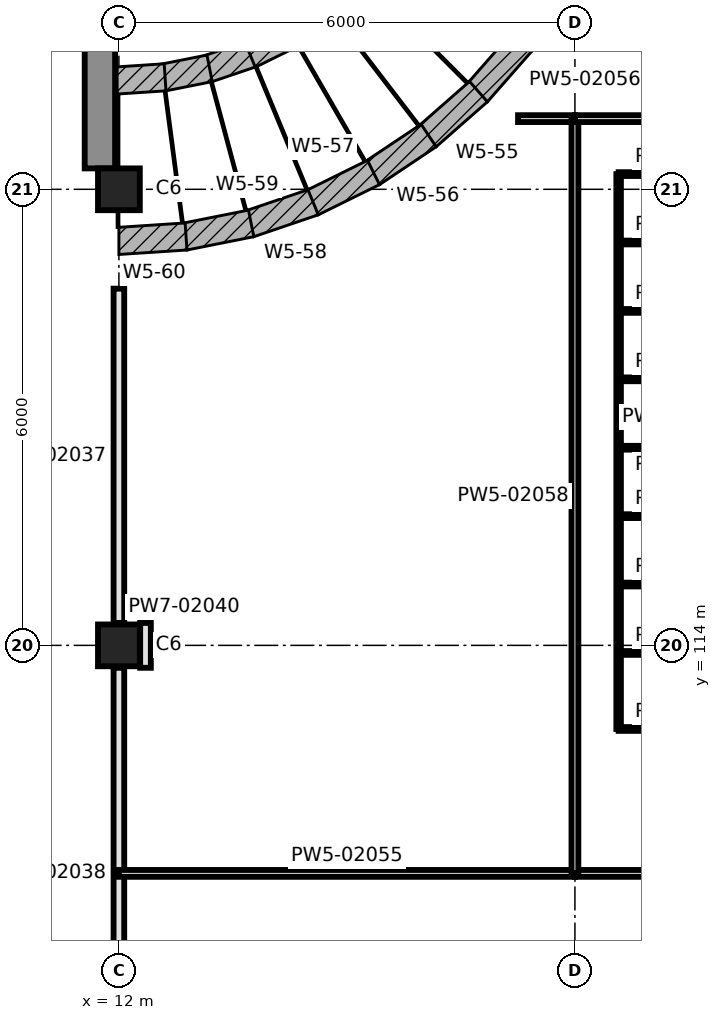
"""IFC4 building model, lengths in metres.
Left out: names, types, materials, properties, quantities, classifications, styles, units other than length and angle.
Written with IfcOpenShell. Run it as: python <this file> out.ifc"""

import sys

from ifc_helpers import new_model, si_unit, direction, frame, frame_2d, origin, origin_2d, place, context, subcontext, project, spatial, polyline, rectangle, outline, extrude, element, fill, save


model = new_model("IFC4")
c1 = context("Model", 3, precision=1e-05, world=origin(), true_north=direction((0.0, 1.0)))
c2 = subcontext(c1, "Body", "Model", "MODEL_VIEW")
j1 = project(units=[si_unit("LENGTHUNIT", "METRE"), si_unit("PLANEANGLEUNIT", "RADIAN")], contexts=[c1])
p1 = place(None, origin())
s1 = spatial("IfcSite", under=j1, at=p1, CompositionType="ELEMENT")
p2 = place(p1, origin())
s2 = spatial("IfcBuilding", under=s1, at=p2, CompositionType="ELEMENT")
p3 = place(p2, frame((0.0, 0.0, 12.0)))
s3 = spatial("IfcBuildingStorey", under=s2, at=p3, CompositionType="ELEMENT", Elevation=12.0)
for number, where, z_axis, x_axis in (
    (1, (12.0, 114.0, 0.0), (0.0, 0.0, 1.0), (1.0, 0.0, 0.0)),
    (2, (12.0, 120.0, 0.0), (0.0, 0.0, 1.0), (1.0, 0.0, 0.0)),
):
    element("IfcColumn", number, at=place(p3, frame(where, z_axis=z_axis, x_axis=x_axis)), inside=s3, PredefinedType="COLUMN", context=c2, shape_type="SweptSolid", body=[
        extrude(rectangle(XDim=0.55, YDim=0.55, at=origin_2d()), origin(), (0.0, 0.0, 1.0), 4.25),
    ])
p4 = place(p3, frame((17.938, 122.571, 0.0), z_axis=(0.74138193161, -0.495258620594, 0.452848462745), x_axis=(-0.555487117891, -0.831525141854, 1.792587e-05)))
e3 = element("IfcWall", 3, at=p4, inside=s3, PredefinedType="SOLIDWALL", context=c2, shape_type="SweptSolid", body=[
    extrude(outline(polyline([(0.0, 0.0), (0.897, -2.776e-17), (0.759, -4.654), (0.138, -4.655), (0.0, 0.0)])), origin(), (9.955e-05, 0.453, 0.892), 0.449),
])
p5 = place(p3, frame((17.44, 121.825, 0.0), z_axis=(0.67027340996, -0.587941516676, 0.452833665786), x_axis=(-0.659435029258, -0.751761559077, 2.1938488e-05)))
e4 = element("IfcWall", 4, at=p5, inside=s3, PredefinedType="SOLIDWALL", context=c2, shape_type="SweptSolid", body=[
    extrude(outline(polyline([(0.0, 0.0), (0.897, -2.776e-17), (0.759, -4.654), (0.138, -4.654), (0.0, 0.0)])), origin(), (-0.0, 0.453, 0.892), 0.449),
])
p6 = place(p3, frame((16.848, 121.151, 0.0), z_axis=(0.58793091204, -0.670281410701, 0.452835591728), x_axis=(-0.75177274522, -0.659422276866, -1.779507e-05)))
e5 = element("IfcWall", 5, at=p6, inside=s3, PredefinedType="SOLIDWALL", context=c2, shape_type="SweptSolid", body=[
    extrude(outline(polyline([(0.0, 0.0), (0.897, 5.551e-17), (0.758, -4.654), (0.138, -4.654), (0.0, 0.0)])), origin(), (0.0, 0.453, 0.892), 0.449),
])
p7 = place(p3, frame((16.174, 120.56, 0.0), z_axis=(0.495362670827, -0.741323001014, 0.452831130245), x_axis=(-0.831466073356, -0.55557552822, 3.6077311e-05)))
e6 = element("IfcWall", 6, at=p7, inside=s3, PredefinedType="SOLIDWALL", context=c2, shape_type="SweptSolid", body=[
    extrude(outline(polyline([(0.0, 0.0), (0.897, 0.0), (0.759, -4.654), (0.138, -4.654), (0.0, 0.0)])), origin(), (6.778e-06, 0.453, 0.892), 0.449),
])
p8 = place(p3, frame((15.428, 120.061, 0.0), z_axis=(0.394311536262, -0.799667811809, 0.452824251921), x_axis=(-0.896885337172, -0.44226314716, -2.5104622e-05)))
e7 = element("IfcWall", 7, at=p8, inside=s3, PredefinedType="SOLIDWALL", context=c2, shape_type="SweptSolid", body=[
    extrude(outline(polyline([(0.0, 0.0), (0.897, 0.0), (0.759, -4.654), (0.138, -4.654), (0.0, 0.0)])), origin(), (-2.864e-05, 0.453, 0.892), 0.449),
])
p9 = place(p3, frame((14.624, 119.665, 0.0), z_axis=(0.286590212598, -0.84427927495, 0.4528339165), x_axis=(-0.946930554063, -0.321438214512, -5.728117e-06)))
e8 = element("IfcWall", 8, at=p9, inside=s3, PredefinedType="SOLIDWALL", context=c2, shape_type="SweptSolid", body=[
    extrude(outline(polyline([(0.0, 0.0), (0.897, 0.0), (0.759, -4.654), (0.138, -4.654), (0.0, 0.0)])), origin(), (-9.219e-07, 0.453, 0.892), 0.449),
])
p10 = place(p3, frame((13.775, 119.376, 0.0), z_axis=(0.173864175636, -0.874485160623, 0.452821104058), x_axis=(-0.980806494595, -0.194983637213, 3.7134606e-05)))
e9 = element("IfcWall", 9, at=p10, inside=s3, PredefinedType="SOLIDWALL", context=c2, shape_type="SweptSolid", body=[
    extrude(outline(polyline([(0.0, 0.0), (0.897, 0.0), (0.759, -4.654), (0.138, -4.654), (0.0, 0.0)])), origin(), (-0.0, 0.453, 0.892), 0.449),
])
p11 = place(p3, frame((12.895, 119.201, 0.0), z_axis=(0.058375301922, -0.889685498337, 0.452826719811), x_axis=(-0.997852682036, -0.065498262539, -5.0577314e-05)))
e10 = element("IfcWall", 10, at=p11, inside=s3, PredefinedType="SOLIDWALL", context=c2, shape_type="SweptSolid", body=[
    extrude(outline(polyline([(0.0, 0.0), (0.897, 3.469e-18), (0.758, -4.654), (0.138, -4.654), (0.0, 0.0)])), origin(), (9.547e-05, 0.453, 0.892), 0.449),
])
p12 = place(p3, frame((11.75, 125.524, 0.0), z_axis=(0.0, 0.0, 1.0), x_axis=(0.0, -1.0, 0.0)))
e11 = element("IfcWall", 11, at=p12, inside=s3, PredefinedType="SOLIDWALL", context=c2, shape_type="SweptSolid", body=[
    extrude(rectangle(XDim=5.25, YDim=0.4, at=frame_2d((2.625, 0.0))), origin(), (0.0, 0.0, 1.0), 4.25),
])
p13 = place(p3, frame((12.0, 114.295, 0.0), z_axis=(0.0, 0.0, 1.0), x_axis=(0.0, 1.0, 0.0)))
e12 = element("IfcWall", 12, at=p13, inside=s3, PredefinedType="PARTITIONING", context=c2, shape_type="SweptSolid", body=[
    extrude(rectangle(XDim=4.398, YDim=0.14, at=frame_2d((2.199, 0.0))), origin(), (0.0, 0.0, 1.0), 3.45),
])
p14 = place(p13, frame((0.155, 0.0, 0.0)))
e13 = element("IfcOpeningElement", 13, at=p14, cuts=e12, PredefinedType="OPENING", context=c2, shape_type="SweptSolid", body=[
    extrude(rectangle(XDim=0.92, YDim=2.04, at=frame_2d((0.46, 1.02))), frame((0.0, 0.08, 0.0), z_axis=(0.0, -1.0, 0.0), x_axis=(1.0, 0.0, 0.0)), (0.0, 0.0, 1.0), 0.16),
])
p15 = place(p3, frame((12.0, 108.295, 0.0), z_axis=(0.0, 0.0, 1.0), x_axis=(0.0, 1.0, 0.0)))
e14 = element("IfcWall", 14, at=p15, inside=s3, PredefinedType="PARTITIONING", context=c2, shape_type="SweptSolid", body=[
    extrude(rectangle(XDim=5.41, YDim=0.14, at=frame_2d((2.705, 0.0))), origin(), (0.0, 0.0, 1.0), 3.45),
])
p16 = place(p15, frame((0.255, 0.0, 0.0)))
e15 = element("IfcOpeningElement", 15, at=p16, cuts=e14, PredefinedType="OPENING", context=c2, shape_type="SweptSolid", body=[
    extrude(rectangle(XDim=1.8, YDim=2.1, at=frame_2d((0.9, 1.05))), frame((0.0, 0.08, 0.0), z_axis=(0.0, -1.0, 0.0), x_axis=(1.0, 0.0, 0.0)), (0.0, 0.0, 1.0), 0.16),
])
p17 = place(p3, frame((12.35, 113.705, 0.0), z_axis=(0.0, 0.0, 1.0), x_axis=(0.0, 1.0, 0.0)))
e16 = element("IfcWall", 16, at=p17, inside=s3, PredefinedType="PARTITIONING", context=c2, shape_type="SweptSolid", body=[
    extrude(rectangle(XDim=0.59, YDim=0.14, at=frame_2d((0.295, 0.0))), origin(), (0.0, 0.0, 1.0), 4.25),
])
p18 = place(p3, frame((12.0, 111.0, 0.0), z_axis=(0.0, 0.0, 1.0), x_axis=(1.0, 0.0, 0.0)))
e17 = element("IfcWall", 17, at=p18, inside=s3, PredefinedType="PARTITIONING", context=c2, shape_type="SweptSolid", body=[
    extrude(rectangle(XDim=6.0, YDim=0.09, at=frame_2d((3.0, 0.0))), origin(), (0.0, 0.0, 1.0), 4.25),
])
p19 = place(p3, frame((17.251, 120.93, 0.0), z_axis=(0.0, 0.0, 1.0), x_axis=(1.0, 0.0, 0.0)))
e18 = element("IfcWall", 18, at=p19, inside=s3, PredefinedType="PARTITIONING", context=c2, shape_type="SweptSolid", body=[
    extrude(rectangle(XDim=0.749, YDim=0.09, at=frame_2d((0.374, 0.0))), origin(), (0.0, 0.0, 1.0), 4.25),
])
p20 = place(p3, frame((18.0, 111.0, 0.0), z_axis=(0.0, 0.0, 1.0), x_axis=(1.0, 0.0, 0.0)))
e19 = element("IfcWall", 19, at=p20, inside=s3, PredefinedType="PARTITIONING", context=c2, shape_type="SweptSolid", body=[
    extrude(rectangle(XDim=6.0, YDim=0.09, at=frame_2d((3.0, 0.0))), origin(), (0.0, 0.0, 1.0), 4.25),
])
p21 = place(p20, frame((2.55, 0.0, 0.0)))
e20 = element("IfcOpeningElement", 20, at=p21, cuts=e19, PredefinedType="OPENING", context=c2, shape_type="SweptSolid", body=[
    extrude(rectangle(XDim=0.92, YDim=2.04, at=frame_2d((0.46, 1.02))), frame((0.0, 0.055, 0.0), z_axis=(0.0, -1.0, 0.0), x_axis=(1.0, 0.0, 0.0)), (0.0, 0.0, 1.0), 0.11),
])
p22 = place(p3, frame((18.0, 111.0, 0.0), z_axis=(0.0, 0.0, 1.0), x_axis=(0.0, 1.0, 0.0)))
e21 = element("IfcWall", 21, at=p22, inside=s3, PredefinedType="PARTITIONING", context=c2, shape_type="SweptSolid", body=[
    extrude(rectangle(XDim=9.93, YDim=0.09, at=frame_2d((4.965, 0.0))), origin(), (0.0, 0.0, 1.0), 4.25),
])
p23 = place(p3, frame((18.0, 120.93, 0.0), z_axis=(0.0, 0.0, 1.0), x_axis=(1.0, 0.0, 0.0)))
e22 = element("IfcWall", 22, at=p23, inside=s3, PredefinedType="PARTITIONING", context=c2, shape_type="SweptSolid", body=[
    extrude(rectangle(XDim=6.0, YDim=0.09, at=frame_2d((3.0, 0.0))), origin(), (0.0, 0.0, 1.0), 4.25),
])
p24 = place(p3, frame((18.575, 112.9, 0.0), z_axis=(0.0, 0.0, 1.0), x_axis=(0.0, 1.0, 0.0)))
e23 = element("IfcWall", 23, at=p24, inside=s3, PredefinedType="PARTITIONING", context=c2, shape_type="SweptSolid", body=[
    extrude(rectangle(XDim=7.3, YDim=0.06, at=frame_2d((3.65, 0.0))), origin(), (0.0, 0.0, 1.0), 2.1),
])
for number, where, z_axis, x_axis in (
    (24, (18.575, 112.9, 0.0), (0.0, 0.0, 1.0), (1.0, 0.0, 0.0)),
    (25, (18.575, 113.9, 0.0), (0.0, 0.0, 1.0), (1.0, 0.0, 0.0)),
    (26, (18.575, 114.8, 0.0), (0.0, 0.0, 1.0), (1.0, 0.0, 0.0)),
    (27, (18.575, 115.7, 0.0), (0.0, 0.0, 1.0), (1.0, 0.0, 0.0)),
    (28, (18.575, 116.6, 0.0), (0.0, 0.0, 1.0), (1.0, 0.0, 0.0)),
    (29, (18.575, 117.5, 0.0), (0.0, 0.0, 1.0), (1.0, 0.0, 0.0)),
    (30, (18.575, 118.4, 0.0), (0.0, 0.0, 1.0), (1.0, 0.0, 0.0)),
    (31, (18.575, 119.3, 0.0), (0.0, 0.0, 1.0), (1.0, 0.0, 0.0)),
    (32, (18.575, 120.2, 0.0), (0.0, 0.0, 1.0), (1.0, 0.0, 0.0)),
):
    element("IfcWall", number, at=place(p3, frame(where, z_axis=z_axis, x_axis=x_axis)), inside=s3, PredefinedType="PARTITIONING", context=c2, shape_type="SweptSolid", body=[
        extrude(rectangle(XDim=1.9, YDim=0.05, at=frame_2d((0.95, 0.0))), origin(), (0.0, 0.0, 1.0), 2.1),
    ])
p25 = place(p14, frame((0.92, 0.0, 0.0), z_axis=(0.0, 0.0, 1.0), x_axis=(-1.0, 0.0, 0.0)))
e33 = element("IfcDoor", 33, at=p25, inside=s3, OperationType="SINGLE_SWING_RIGHT", PredefinedType="DOOR", context=c2, shape_type="SweptSolid", body=[
    extrude(rectangle(XDim=0.92, YDim=2.04, at=frame_2d((0.46, 1.02))), frame((0.0, 0.025, 0.0), z_axis=(0.0, -1.0, 0.0), x_axis=(1.0, 0.0, 0.0)), (0.0, 0.0, 1.0), 0.05),
])
fill(e13, e33)
p26 = place(p16, frame((1.8, 0.0, 0.0), z_axis=(0.0, 0.0, 1.0), x_axis=(-1.0, 0.0, 0.0)))
e34 = element("IfcDoor", 34, at=p26, inside=s3, OperationType="DOUBLE_DOOR_SINGLE_SWING", PredefinedType="DOOR", context=c2, shape_type="SweptSolid", body=[
    extrude(rectangle(XDim=1.8, YDim=2.1, at=frame_2d((0.9, 1.05))), frame((0.0, 0.025, 0.0), z_axis=(0.0, -1.0, 0.0), x_axis=(1.0, 0.0, 0.0)), (0.0, 0.0, 1.0), 0.05),
])
fill(e15, e34)
save(model, sys.argv[1])
